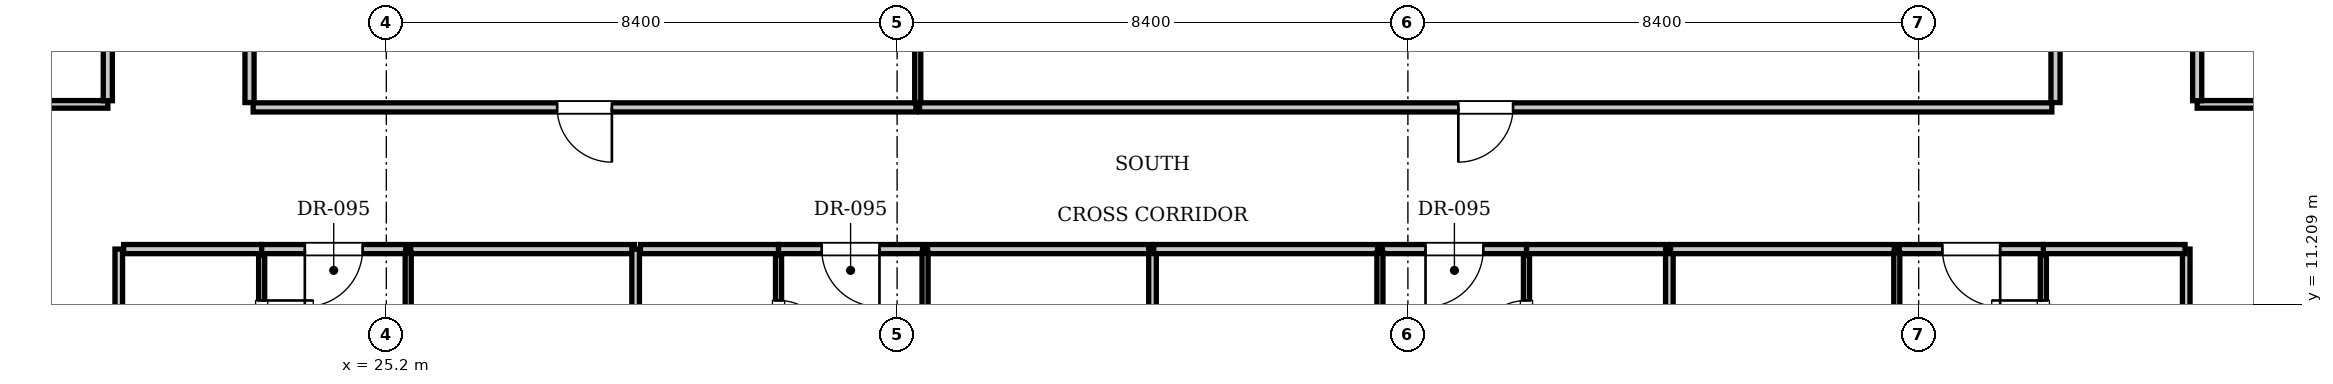
"""IFC4 building model, lengths in metres.
Left out: names, types, materials, properties, quantities, classifications, styles, units other than length and angle.
Written with IfcOpenShell. Run it as: python <this file> out.ifc"""

import sys

from ifc_helpers import new_model, si_unit, direction, frame, frame_2d, origin, place, context, subcontext, project, spatial, rectangle, extrude, element, fill, save


model = new_model("IFC4")
c1 = context("Model", 3, precision=1e-05, world=origin(), true_north=direction((0.0, 1.0)))
c2 = subcontext(c1, "Body", "Model", "MODEL_VIEW")
j1 = project(units=[si_unit("LENGTHUNIT", "METRE"), si_unit("PLANEANGLEUNIT", "RADIAN")], contexts=[c1])
p1 = place(None, origin())
s1 = spatial("IfcSite", under=j1, at=p1, CompositionType="ELEMENT")
p2 = place(p1, origin())
s2 = spatial("IfcBuilding", under=s1, at=p2, CompositionType="ELEMENT")
p3 = place(p2, frame((0.0, 0.0, 88.55)))
s3 = spatial("IfcBuildingStorey", under=s2, at=p3, CompositionType="ELEMENT", Elevation=88.55)
for number, where, z_axis, x_axis in (
    (1, (22.95, 14.53, 0.0), (0.0, 0.0, 1.0), (0.0, 1.0, 0.0)),
    (2, (52.65, 14.53, 0.0), (0.0, 0.0, 1.0), (0.0, 1.0, 0.0)),
):
    element("IfcWall", number, at=place(p3, frame(where, z_axis=z_axis, x_axis=x_axis)), inside=s3, PredefinedType="PARTITIONING", context=c2, shape_type="SweptSolid", body=[
        extrude(rectangle(XDim=8.43, YDim=0.15, at=frame_2d((4.215, 0.0))), origin(), (0.0, 0.0, 1.0), 3.61),
    ])
p4 = place(p3, frame((23.01, 14.45, 0.0), z_axis=(0.0, 0.0, 1.0), x_axis=(1.0, 0.0, 0.0)))
e3 = element("IfcWall", 3, at=p4, inside=s3, PredefinedType="PARTITIONING", context=c2, shape_type="SweptSolid", body=[
    extrude(rectangle(XDim=10.899, YDim=0.15, at=frame_2d((5.449, 0.0))), origin(), (0.0, 0.0, 1.0), 3.61),
])
p5 = place(p4, frame((5.0, 0.0, 0.0)))
e4 = element("IfcOpeningElement", 4, at=p5, cuts=e3, PredefinedType="OPENING", context=c2, shape_type="SweptSolid", body=[
    extrude(rectangle(XDim=0.9, YDim=2.1, at=frame_2d((0.45, 1.05))), frame((0.0, 0.085, 0.0), z_axis=(0.0, -1.0, 0.0), x_axis=(1.0, 0.0, 0.0)), (0.0, 0.0, 1.0), 0.17),
])
p6 = place(p3, frame((33.939, 14.53, 0.0), z_axis=(0.0, 0.0, 1.0), x_axis=(0.0, 1.0, 0.0)))
e5 = element("IfcWall", 5, at=p6, inside=s3, PredefinedType="PARTITIONING", context=c2, shape_type="SweptSolid", body=[
    extrude(rectangle(XDim=8.43, YDim=0.1, at=frame_2d((4.215, 0.0))), origin(), (0.0, 0.0, 1.0), 3.61),
])
p7 = place(p3, frame((33.969, 14.45, 0.0), z_axis=(0.0, 0.0, 1.0), x_axis=(1.0, 0.0, 0.0)))
e6 = element("IfcWall", 6, at=p7, inside=s3, PredefinedType="PARTITIONING", context=c2, shape_type="SweptSolid", body=[
    extrude(rectangle(XDim=18.621, YDim=0.15, at=frame_2d((9.311, 0.0))), origin(), (0.0, 0.0, 1.0), 3.61),
])
p8 = place(p7, frame((8.861, 0.0, 0.0)))
e7 = element("IfcOpeningElement", 7, at=p8, cuts=e6, PredefinedType="OPENING", context=c2, shape_type="SweptSolid", body=[
    extrude(rectangle(XDim=0.9, YDim=2.1, at=frame_2d((0.45, 1.05))), frame((0.0, 0.085, 0.0), z_axis=(0.0, -1.0, 0.0), x_axis=(1.0, 0.0, 0.0)), (0.0, 0.0, 1.0), 0.17),
])
for number, where, z_axis, x_axis in (
    (8, (20.8, 0.1, 0.0), (0.0, 0.0, 1.0), (0.0, 1.0, 0.0)),
    (9, (54.8, 0.1, 0.0), (0.0, 0.0, 1.0), (0.0, 1.0, 0.0)),
):
    element("IfcWall", number, at=place(p3, frame(where, z_axis=z_axis, x_axis=x_axis)), inside=s3, PredefinedType="PARTITIONING", context=c2, shape_type="SweptSolid", body=[
        extrude(rectangle(XDim=12.02, YDim=0.125, at=frame_2d((6.01, 0.0))), origin(), (0.0, 0.0, 1.0), 3.61),
    ])
p9 = place(p3, frame((20.88, 12.12, 0.0), z_axis=(0.0, 0.0, 1.0), x_axis=(1.0, 0.0, 0.0)))
e10 = element("IfcWall", 10, at=p9, inside=s3, PredefinedType="PARTITIONING", context=c2, shape_type="SweptSolid", body=[
    extrude(rectangle(XDim=2.27, YDim=0.15, at=frame_2d((1.135, 0.0))), origin(), (0.0, 0.0, 1.0), 3.61),
])
p10 = place(p3, frame((23.15, 9.68, 0.0), z_axis=(0.0, 0.0, 1.0), x_axis=(0.0, 1.0, 0.0)))
e11 = element("IfcWall", 11, at=p10, inside=s3, PredefinedType="PARTITIONING", context=c2, shape_type="SweptSolid", body=[
    extrude(rectangle(XDim=2.34, YDim=0.1, at=frame_2d((1.17, 0.0))), origin(), (0.0, 0.0, 1.0), 3.61),
])
p11 = place(p10, frame((0.745, 0.0, 0.0)))
e12 = element("IfcOpeningElement", 12, at=p11, cuts=e11, PredefinedType="OPENING", context=c2, shape_type="SweptSolid", body=[
    extrude(rectangle(XDim=0.85, YDim=2.1, at=frame_2d((0.425, 1.05))), frame((0.0, 0.06, 0.0), z_axis=(0.0, -1.0, 0.0), x_axis=(1.0, 0.0, 0.0)), (0.0, 0.0, 1.0), 0.12),
])
p12 = place(p3, frame((23.15, 12.12, 0.0), z_axis=(0.0, 0.0, 1.0), x_axis=(1.0, 0.0, 0.0)))
e13 = element("IfcWall", 13, at=p12, inside=s3, PredefinedType="PARTITIONING", context=c2, shape_type="SweptSolid", body=[
    extrude(rectangle(XDim=2.37, YDim=0.15, at=frame_2d((1.185, 0.0))), origin(), (0.0, 0.0, 1.0), 3.61),
])
p13 = place(p12, frame((0.71, 0.0, 0.0)))
e14 = element("IfcOpeningElement", 14, at=p13, cuts=e13, PredefinedType="OPENING", context=c2, shape_type="SweptSolid", body=[
    extrude(rectangle(XDim=0.95, YDim=2.15, at=frame_2d((0.475, 1.075))), frame((0.0, 0.085, 0.0), z_axis=(0.0, -1.0, 0.0), x_axis=(1.0, 0.0, 0.0)), (0.0, 0.0, 1.0), 0.17),
])
p14 = place(p3, frame((25.6, 12.12, 0.0), z_axis=(0.0, 0.0, 1.0), x_axis=(1.0, 0.0, 0.0)))
e15 = element("IfcWall", 15, at=p14, inside=s3, PredefinedType="PARTITIONING", context=c2, shape_type="SweptSolid", body=[
    extrude(rectangle(XDim=3.68, YDim=0.15, at=frame_2d((1.84, 0.0))), origin(), (0.0, 0.0, 1.0), 3.61),
])
p15 = place(p3, frame((25.56, 0.03, 0.0), z_axis=(0.0, 0.0, 1.0), x_axis=(0.0, 1.0, 0.0)))
e16 = element("IfcWall", 16, at=p15, inside=s3, PredefinedType="PARTITIONING", context=c2, shape_type="SweptSolid", body=[
    extrude(rectangle(XDim=12.03, YDim=0.1, at=frame_2d((6.015, 0.0))), origin(), (0.0, 0.0, 1.0), 3.61),
])
p16 = place(p15, frame((1.6, 0.0, 0.0)))
e17 = element("IfcOpeningElement", 17, at=p16, cuts=e16, PredefinedType="OPENING", context=c2, shape_type="SweptSolid", body=[
    extrude(rectangle(XDim=0.9, YDim=2.1, at=frame_2d((0.45, 1.05))), frame((0.0, 0.06, 0.0), z_axis=(0.0, -1.0, 0.0), x_axis=(1.0, 0.0, 0.0)), (0.0, 0.0, 1.0), 0.12),
])
p17 = place(p3, frame((29.3, 0.1, 0.0), z_axis=(0.0, 0.0, 1.0), x_axis=(0.0, 1.0, 0.0)))
e18 = element("IfcWall", 18, at=p17, inside=s3, PredefinedType="PARTITIONING", context=c2, shape_type="SweptSolid", body=[
    extrude(rectangle(XDim=12.02, YDim=0.125, at=frame_2d((6.01, 0.0))), origin(), (0.0, 0.0, 1.0), 3.255),
])
p18 = place(p3, frame((29.38, 12.12, 0.0), z_axis=(0.0, 0.0, 1.0), x_axis=(1.0, 0.0, 0.0)))
e19 = element("IfcWall", 19, at=p18, inside=s3, PredefinedType="PARTITIONING", context=c2, shape_type="SweptSolid", body=[
    extrude(rectangle(XDim=2.27, YDim=0.15, at=frame_2d((1.135, 0.0))), origin(), (0.0, 0.0, 1.0), 3.61),
])
p19 = place(p3, frame((31.65, 9.68, 0.0), z_axis=(0.0, 0.0, 1.0), x_axis=(0.0, 1.0, 0.0)))
e20 = element("IfcWall", 20, at=p19, inside=s3, PredefinedType="PARTITIONING", context=c2, shape_type="SweptSolid", body=[
    extrude(rectangle(XDim=2.34, YDim=0.1, at=frame_2d((1.17, 0.0))), origin(), (0.0, 0.0, 1.0), 3.61),
])
p20 = place(p19, frame((0.745, 0.0, 0.0)))
e21 = element("IfcOpeningElement", 21, at=p20, cuts=e20, PredefinedType="OPENING", context=c2, shape_type="SweptSolid", body=[
    extrude(rectangle(XDim=0.85, YDim=2.1, at=frame_2d((0.425, 1.05))), frame((0.0, 0.06, 0.0), z_axis=(0.0, -1.0, 0.0), x_axis=(1.0, 0.0, 0.0)), (0.0, 0.0, 1.0), 0.12),
])
p21 = place(p3, frame((31.65, 12.12, 0.0), z_axis=(0.0, 0.0, 1.0), x_axis=(1.0, 0.0, 0.0)))
e22 = element("IfcWall", 22, at=p21, inside=s3, PredefinedType="PARTITIONING", context=c2, shape_type="SweptSolid", body=[
    extrude(rectangle(XDim=2.37, YDim=0.15, at=frame_2d((1.185, 0.0))), origin(), (0.0, 0.0, 1.0), 3.61),
])
p22 = place(p21, frame((0.71, 0.0, 0.0)))
e23 = element("IfcOpeningElement", 23, at=p22, cuts=e22, PredefinedType="OPENING", context=c2, shape_type="SweptSolid", body=[
    extrude(rectangle(XDim=0.95, YDim=2.15, at=frame_2d((0.475, 1.075))), frame((0.0, 0.085, 0.0), z_axis=(0.0, -1.0, 0.0), x_axis=(1.0, 0.0, 0.0)), (0.0, 0.0, 1.0), 0.17),
])
p23 = place(p3, frame((34.1, 12.12, 0.0), z_axis=(0.0, 0.0, 1.0), x_axis=(1.0, 0.0, 0.0)))
e24 = element("IfcWall", 24, at=p23, inside=s3, PredefinedType="PARTITIONING", context=c2, shape_type="SweptSolid", body=[
    extrude(rectangle(XDim=3.68, YDim=0.15, at=frame_2d((1.84, 0.0))), origin(), (0.0, 0.0, 1.0), 3.61),
])
p24 = place(p3, frame((34.06, 0.03, 0.0), z_axis=(0.0, 0.0, 1.0), x_axis=(0.0, 1.0, 0.0)))
e25 = element("IfcWall", 25, at=p24, inside=s3, PredefinedType="PARTITIONING", context=c2, shape_type="SweptSolid", body=[
    extrude(rectangle(XDim=12.03, YDim=0.1, at=frame_2d((6.015, 0.0))), origin(), (0.0, 0.0, 1.0), 3.61),
])
p25 = place(p24, frame((1.6, 0.0, 0.0)))
e26 = element("IfcOpeningElement", 26, at=p25, cuts=e25, PredefinedType="OPENING", context=c2, shape_type="SweptSolid", body=[
    extrude(rectangle(XDim=0.9, YDim=2.1, at=frame_2d((0.45, 1.05))), frame((0.0, 0.06, 0.0), z_axis=(0.0, -1.0, 0.0), x_axis=(1.0, 0.0, 0.0)), (0.0, 0.0, 1.0), 0.12),
])
p26 = place(p3, frame((37.8, 0.1, 0.0), z_axis=(0.0, 0.0, 1.0), x_axis=(0.0, 1.0, 0.0)))
e27 = element("IfcWall", 27, at=p26, inside=s3, PredefinedType="PARTITIONING", context=c2, shape_type="SweptSolid", body=[
    extrude(rectangle(XDim=12.02, YDim=0.125, at=frame_2d((6.01, 0.0))), origin(), (0.0, 0.0, 1.0), 3.293),
])
p27 = place(p3, frame((43.95, 12.12, 0.0), z_axis=(0.0, 0.0, 1.0), x_axis=(1.0, 0.0, 0.0)))
e28 = element("IfcWall", 28, at=p27, inside=s3, PredefinedType="PARTITIONING", context=c2, shape_type="SweptSolid", body=[
    extrude(rectangle(XDim=2.33, YDim=0.15, at=frame_2d((1.165, 0.0))), origin(), (0.0, 0.0, 1.0), 3.61),
])
p28 = place(p3, frame((43.95, 9.68, 0.0), z_axis=(0.0, 0.0, 1.0), x_axis=(0.0, 1.0, 0.0)))
e29 = element("IfcWall", 29, at=p28, inside=s3, PredefinedType="PARTITIONING", context=c2, shape_type="SweptSolid", body=[
    extrude(rectangle(XDim=2.34, YDim=0.1, at=frame_2d((1.17, 0.0))), origin(), (0.0, 0.0, 1.0), 3.61),
])
p29 = place(p28, frame((0.745, 0.0, 0.0)))
e30 = element("IfcOpeningElement", 30, at=p29, cuts=e29, PredefinedType="OPENING", context=c2, shape_type="SweptSolid", body=[
    extrude(rectangle(XDim=0.85, YDim=2.1, at=frame_2d((0.425, 1.05))), frame((0.0, 0.06, 0.0), z_axis=(0.0, -1.0, 0.0), x_axis=(1.0, 0.0, 0.0)), (0.0, 0.0, 1.0), 0.12),
])
p30 = place(p3, frame((37.82, 12.12, 0.0), z_axis=(0.0, 0.0, 1.0), x_axis=(1.0, 0.0, 0.0)))
e31 = element("IfcWall", 31, at=p30, inside=s3, PredefinedType="PARTITIONING", context=c2, shape_type="SweptSolid", body=[
    extrude(rectangle(XDim=3.68, YDim=0.15, at=frame_2d((1.84, 0.0))), origin(), (0.0, 0.0, 1.0), 3.61),
])
p31 = place(p3, frame((41.58, 12.12, 0.0), z_axis=(0.0, 0.0, 1.0), x_axis=(1.0, 0.0, 0.0)))
e32 = element("IfcWall", 32, at=p31, inside=s3, PredefinedType="PARTITIONING", context=c2, shape_type="SweptSolid", body=[
    extrude(rectangle(XDim=2.37, YDim=0.15, at=frame_2d((1.185, 0.0))), origin(), (0.0, 0.0, 1.0), 3.61),
])
p32 = place(p31, frame((0.71, 0.0, 0.0)))
e33 = element("IfcOpeningElement", 33, at=p32, cuts=e32, PredefinedType="OPENING", context=c2, shape_type="SweptSolid", body=[
    extrude(rectangle(XDim=0.95, YDim=2.15, at=frame_2d((0.475, 1.075))), frame((0.0, 0.085, 0.0), z_axis=(0.0, -1.0, 0.0), x_axis=(1.0, 0.0, 0.0)), (0.0, 0.0, 1.0), 0.17),
])
p33 = place(p3, frame((41.54, 0.03, 0.0), z_axis=(0.0, 0.0, 1.0), x_axis=(0.0, 1.0, 0.0)))
e34 = element("IfcWall", 34, at=p33, inside=s3, PredefinedType="PARTITIONING", context=c2, shape_type="SweptSolid", body=[
    extrude(rectangle(XDim=12.03, YDim=0.1, at=frame_2d((6.015, 0.0))), origin(), (0.0, 0.0, 1.0), 3.61),
])
p34 = place(p33, frame((1.6, 0.0, 0.0)))
e35 = element("IfcOpeningElement", 35, at=p34, cuts=e34, PredefinedType="OPENING", context=c2, shape_type="SweptSolid", body=[
    extrude(rectangle(XDim=0.9, YDim=2.1, at=frame_2d((0.45, 1.05))), frame((0.0, 0.06, 0.0), z_axis=(0.0, -1.0, 0.0), x_axis=(1.0, 0.0, 0.0)), (0.0, 0.0, 1.0), 0.12),
])
p35 = place(p3, frame((46.3, 0.1, 0.0), z_axis=(0.0, 0.0, 1.0), x_axis=(0.0, 1.0, 0.0)))
e36 = element("IfcWall", 36, at=p35, inside=s3, PredefinedType="PARTITIONING", context=c2, shape_type="SweptSolid", body=[
    extrude(rectangle(XDim=12.02, YDim=0.125, at=frame_2d((6.01, 0.0))), origin(), (0.0, 0.0, 1.0), 3.344),
])
p36 = place(p3, frame((52.45, 12.12, 0.0), z_axis=(0.0, 0.0, 1.0), x_axis=(1.0, 0.0, 0.0)))
e37 = element("IfcWall", 37, at=p36, inside=s3, PredefinedType="PARTITIONING", context=c2, shape_type="SweptSolid", body=[
    extrude(rectangle(XDim=2.33, YDim=0.15, at=frame_2d((1.165, 0.0))), origin(), (0.0, 0.0, 1.0), 3.61),
])
p37 = place(p3, frame((52.45, 9.68, 0.0), z_axis=(0.0, 0.0, 1.0), x_axis=(0.0, 1.0, 0.0)))
e38 = element("IfcWall", 38, at=p37, inside=s3, PredefinedType="PARTITIONING", context=c2, shape_type="SweptSolid", body=[
    extrude(rectangle(XDim=2.34, YDim=0.1, at=frame_2d((1.17, 0.0))), origin(), (0.0, 0.0, 1.0), 3.61),
])
p38 = place(p37, frame((0.745, 0.0, 0.0)))
e39 = element("IfcOpeningElement", 39, at=p38, cuts=e38, PredefinedType="OPENING", context=c2, shape_type="SweptSolid", body=[
    extrude(rectangle(XDim=0.85, YDim=2.1, at=frame_2d((0.425, 1.05))), frame((0.0, 0.06, 0.0), z_axis=(0.0, -1.0, 0.0), x_axis=(1.0, 0.0, 0.0)), (0.0, 0.0, 1.0), 0.12),
])
p39 = place(p3, frame((46.32, 12.12, 0.0), z_axis=(0.0, 0.0, 1.0), x_axis=(1.0, 0.0, 0.0)))
e40 = element("IfcWall", 40, at=p39, inside=s3, PredefinedType="PARTITIONING", context=c2, shape_type="SweptSolid", body=[
    extrude(rectangle(XDim=3.68, YDim=0.15, at=frame_2d((1.84, 0.0))), origin(), (0.0, 0.0, 1.0), 3.61),
])
p40 = place(p3, frame((50.08, 12.12, 0.0), z_axis=(0.0, 0.0, 1.0), x_axis=(1.0, 0.0, 0.0)))
e41 = element("IfcWall", 41, at=p40, inside=s3, PredefinedType="PARTITIONING", context=c2, shape_type="SweptSolid", body=[
    extrude(rectangle(XDim=2.37, YDim=0.15, at=frame_2d((1.185, 0.0))), origin(), (0.0, 0.0, 1.0), 3.61),
])
p41 = place(p40, frame((0.71, 0.0, 0.0)))
e42 = element("IfcOpeningElement", 42, at=p41, cuts=e41, PredefinedType="OPENING", context=c2, shape_type="SweptSolid", body=[
    extrude(rectangle(XDim=0.95, YDim=2.15, at=frame_2d((0.475, 1.075))), frame((0.0, 0.085, 0.0), z_axis=(0.0, -1.0, 0.0), x_axis=(1.0, 0.0, 0.0)), (0.0, 0.0, 1.0), 0.17),
])
p42 = place(p3, frame((50.04, 0.03, 0.0), z_axis=(0.0, 0.0, 1.0), x_axis=(0.0, 1.0, 0.0)))
e43 = element("IfcWall", 43, at=p42, inside=s3, PredefinedType="PARTITIONING", context=c2, shape_type="SweptSolid", body=[
    extrude(rectangle(XDim=12.03, YDim=0.1, at=frame_2d((6.015, 0.0))), origin(), (0.0, 0.0, 1.0), 3.61),
])
p43 = place(p42, frame((1.6, 0.0, 0.0)))
e44 = element("IfcOpeningElement", 44, at=p43, cuts=e43, PredefinedType="OPENING", context=c2, shape_type="SweptSolid", body=[
    extrude(rectangle(XDim=0.9, YDim=2.1, at=frame_2d((0.45, 1.05))), frame((0.0, 0.06, 0.0), z_axis=(0.0, -1.0, 0.0), x_axis=(1.0, 0.0, 0.0)), (0.0, 0.0, 1.0), 0.12),
])
p44 = place(p3, frame((10.9, 14.5, 0.0), z_axis=(0.0, 0.0, 1.0), x_axis=(1.0, 0.0, 0.0)))
e45 = element("IfcWall", 45, at=p44, inside=s3, PredefinedType="PARTITIONING", context=c2, shape_type="SweptSolid", body=[
    extrude(rectangle(XDim=9.72, YDim=0.125, at=frame_2d((4.86, 0.0))), origin(), (0.0, 0.0, 1.0), 3.61),
])
p45 = place(p3, frame((54.98, 14.5, 0.0), z_axis=(0.0, 0.0, 1.0), x_axis=(1.0, 0.0, 0.0)))
e46 = element("IfcWall", 46, at=p45, inside=s3, PredefinedType="PARTITIONING", context=c2, shape_type="SweptSolid", body=[
    extrude(rectangle(XDim=9.72, YDim=0.125, at=frame_2d((4.86, 0.0))), origin(), (0.0, 0.0, 1.0), 3.61),
])
for number, where, z_axis, x_axis in (
    (47, (20.62, 14.56, 0.0), (0.0, 0.0, 1.0), (0.0, 1.0, 0.0)),
    (48, (54.98, 14.56, 0.0), (0.0, 0.0, 1.0), (0.0, 1.0, 0.0)),
):
    element("IfcWall", number, at=place(p3, frame(where, z_axis=z_axis, x_axis=x_axis)), inside=s3, PredefinedType="PARTITIONING", context=c2, shape_type="SweptSolid", body=[
        extrude(rectangle(XDim=2.02, YDim=0.15, at=frame_2d((1.01, 0.0))), origin(), (0.0, 0.0, 1.0), 3.61),
    ])
p46 = place(p5, frame((0.9, 0.0, 0.0), z_axis=(0.0, 0.0, 1.0), x_axis=(-1.0, 0.0, 0.0)))
e49 = element("IfcDoor", 49, at=p46, inside=s3, OperationType="SINGLE_SWING_LEFT", PredefinedType="DOOR", context=c2, shape_type="SweptSolid", body=[
    extrude(rectangle(XDim=0.9, YDim=2.1, at=frame_2d((0.45, 1.05))), frame((0.0, 0.025, 0.0), z_axis=(0.0, -1.0, 0.0), x_axis=(1.0, 0.0, 0.0)), (0.0, 0.0, 1.0), 0.05),
])
fill(e4, e49)
p47 = place(p8, frame((0.9, 0.0, 0.0), z_axis=(0.0, 0.0, 1.0), x_axis=(-1.0, 0.0, 0.0)))
e50 = element("IfcDoor", 50, at=p47, inside=s3, OperationType="SINGLE_SWING_RIGHT", PredefinedType="DOOR", context=c2, shape_type="SweptSolid", body=[
    extrude(rectangle(XDim=0.9, YDim=2.1, at=frame_2d((0.45, 1.05))), frame((0.0, 0.025, 0.0), z_axis=(0.0, -1.0, 0.0), x_axis=(1.0, 0.0, 0.0)), (0.0, 0.0, 1.0), 0.05),
])
fill(e7, e50)
p48 = place(p11, frame((0.85, 0.0, 0.0), z_axis=(0.0, 0.0, 1.0), x_axis=(-1.0, 0.0, 0.0)))
e51 = element("IfcDoor", 51, at=p48, inside=s3, OperationType="SINGLE_SWING_LEFT", PredefinedType="DOOR", context=c2, shape_type="SweptSolid", body=[
    extrude(rectangle(XDim=0.85, YDim=2.1, at=frame_2d((0.425, 1.05))), frame((0.0, 0.025, 0.0), z_axis=(0.0, -1.0, 0.0), x_axis=(1.0, 0.0, 0.0)), (0.0, 0.0, 1.0), 0.05),
])
fill(e12, e51)
p49 = place(p13, frame((0.95, 0.0, 0.0), z_axis=(0.0, 0.0, 1.0), x_axis=(-1.0, 0.0, 0.0)))
e52 = element("IfcDoor", 52, at=p49, inside=s3, OperationType="SINGLE_SWING_RIGHT", PredefinedType="DOOR", context=c2, shape_type="SweptSolid", body=[
    extrude(rectangle(XDim=0.95, YDim=2.15, at=frame_2d((0.475, 1.075))), frame((0.0, 0.025, 0.0), z_axis=(0.0, -1.0, 0.0), x_axis=(1.0, 0.0, 0.0)), (0.0, 0.0, 1.0), 0.05),
])
fill(e14, e52)
p50 = place(p20, frame((0.85, 0.0, 0.0), z_axis=(0.0, 0.0, 1.0), x_axis=(-1.0, 0.0, 0.0)))
e53 = element("IfcDoor", 53, at=p50, inside=s3, OperationType="SINGLE_SWING_RIGHT", PredefinedType="DOOR", context=c2, shape_type="SweptSolid", body=[
    extrude(rectangle(XDim=0.85, YDim=2.1, at=frame_2d((0.425, 1.05))), frame((0.0, 0.025, 0.0), z_axis=(0.0, -1.0, 0.0), x_axis=(1.0, 0.0, 0.0)), (0.0, 0.0, 1.0), 0.05),
])
fill(e21, e53)
p51 = place(p22, frame((0.95, 0.0, 0.0), z_axis=(0.0, 0.0, 1.0), x_axis=(-1.0, 0.0, 0.0)))
e54 = element("IfcDoor", 54, at=p51, inside=s3, OperationType="SINGLE_SWING_LEFT", PredefinedType="DOOR", context=c2, shape_type="SweptSolid", body=[
    extrude(rectangle(XDim=0.95, YDim=2.15, at=frame_2d((0.475, 1.075))), frame((0.0, 0.025, 0.0), z_axis=(0.0, -1.0, 0.0), x_axis=(1.0, 0.0, 0.0)), (0.0, 0.0, 1.0), 0.05),
])
fill(e23, e54)
p52 = place(p29, origin())
e55 = element("IfcDoor", 55, at=p52, inside=s3, OperationType="SINGLE_SWING_LEFT", PredefinedType="DOOR", context=c2, shape_type="SweptSolid", body=[
    extrude(rectangle(XDim=0.85, YDim=2.1, at=frame_2d((0.425, 1.05))), frame((0.0, 0.025, 0.0), z_axis=(0.0, -1.0, 0.0), x_axis=(1.0, 0.0, 0.0)), (0.0, 0.0, 1.0), 0.05),
])
fill(e30, e55)
p53 = place(p32, frame((0.95, 0.0, 0.0), z_axis=(0.0, 0.0, 1.0), x_axis=(-1.0, 0.0, 0.0)))
e56 = element("IfcDoor", 56, at=p53, inside=s3, OperationType="SINGLE_SWING_RIGHT", PredefinedType="DOOR", context=c2, shape_type="SweptSolid", body=[
    extrude(rectangle(XDim=0.95, YDim=2.15, at=frame_2d((0.475, 1.075))), frame((0.0, 0.025, 0.0), z_axis=(0.0, -1.0, 0.0), x_axis=(1.0, 0.0, 0.0)), (0.0, 0.0, 1.0), 0.05),
])
fill(e33, e56)
p54 = place(p38, origin())
e57 = element("IfcDoor", 57, at=p54, inside=s3, OperationType="SINGLE_SWING_RIGHT", PredefinedType="DOOR", context=c2, shape_type="SweptSolid", body=[
    extrude(rectangle(XDim=0.85, YDim=2.1, at=frame_2d((0.425, 1.05))), frame((0.0, 0.025, 0.0), z_axis=(0.0, -1.0, 0.0), x_axis=(1.0, 0.0, 0.0)), (0.0, 0.0, 1.0), 0.05),
])
fill(e39, e57)
p55 = place(p41, frame((0.95, 0.0, 0.0), z_axis=(0.0, 0.0, 1.0), x_axis=(-1.0, 0.0, 0.0)))
e58 = element("IfcDoor", 58, at=p55, inside=s3, OperationType="SINGLE_SWING_LEFT", PredefinedType="DOOR", context=c2, shape_type="SweptSolid", body=[
    extrude(rectangle(XDim=0.95, YDim=2.15, at=frame_2d((0.475, 1.075))), frame((0.0, 0.025, 0.0), z_axis=(0.0, -1.0, 0.0), x_axis=(1.0, 0.0, 0.0)), (0.0, 0.0, 1.0), 0.05),
])
fill(e42, e58)
save(model, sys.argv[1])
